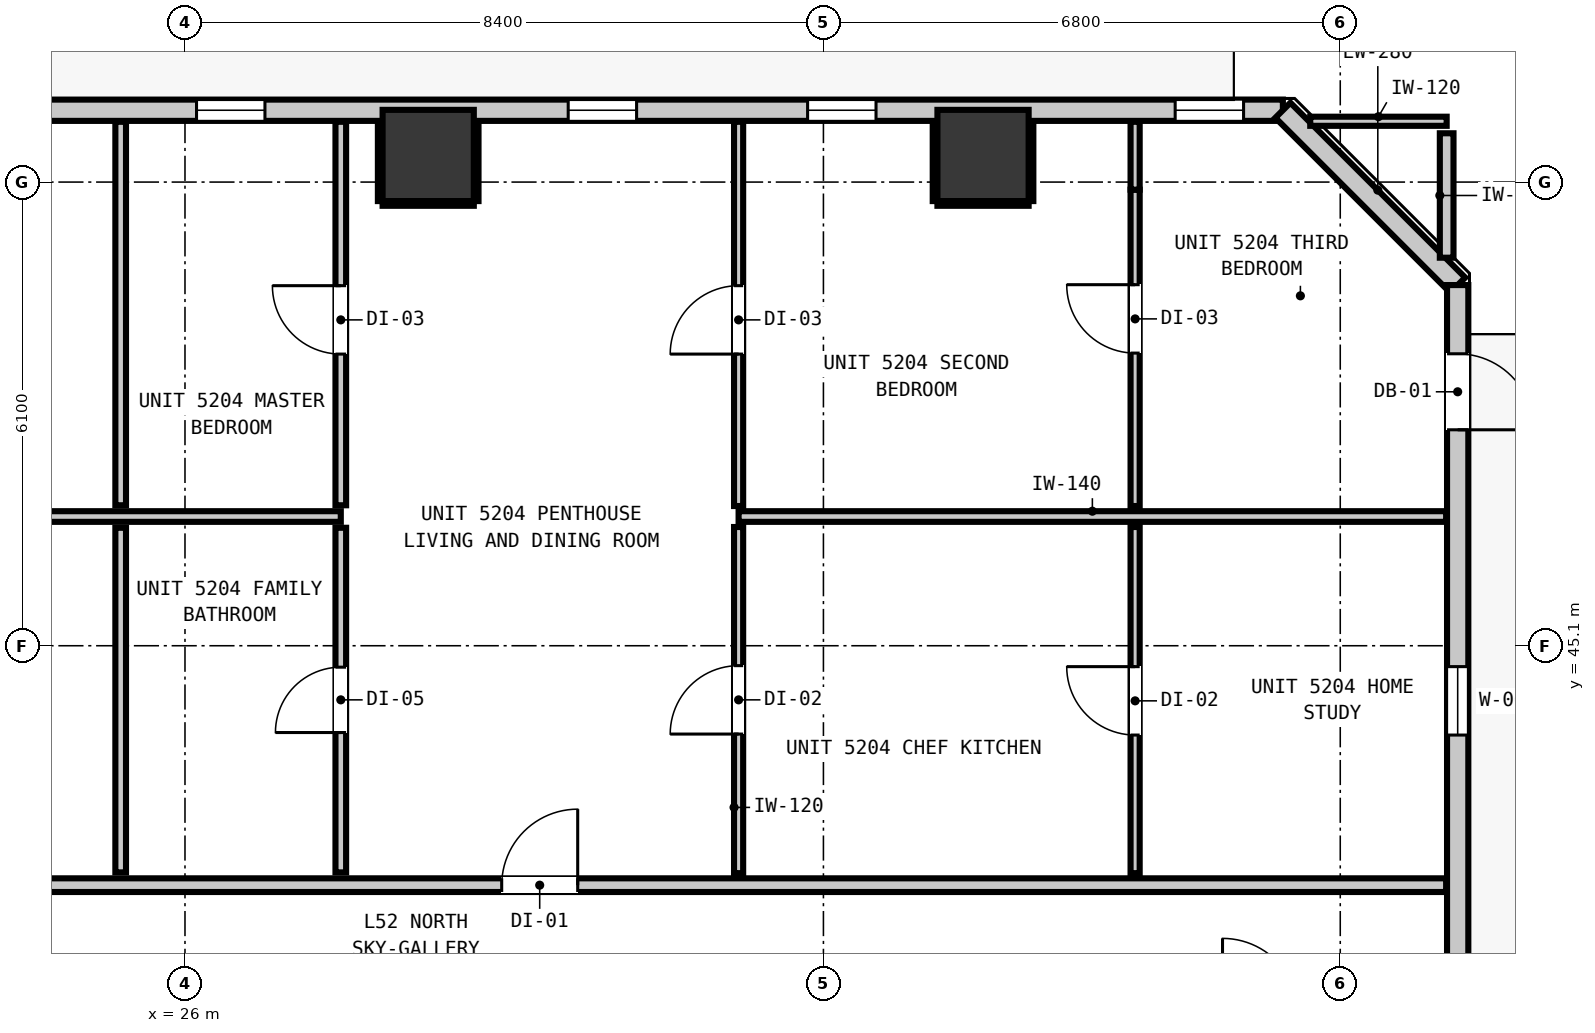
"""IFC4 building model, lengths in metres.
Left out: names, types, materials, properties, quantities, classifications, styles, units other than length and angle.
Written with IfcOpenShell. Run it as: python <this file> out.ifc"""

import sys

from ifc_helpers import new_model, si_unit, direction, frame, frame_2d, origin, origin_2d, place, context, subcontext, project, spatial, rectangle, extrude, element, fill, save


model = new_model("IFC4")
c1 = context("Model", 3, precision=1e-05, world=origin(), true_north=direction((0.0, 1.0)))
c2 = subcontext(c1, "Body", "Model", "MODEL_VIEW")
j1 = project(units=[si_unit("LENGTHUNIT", "METRE"), si_unit("PLANEANGLEUNIT", "RADIAN")], contexts=[c1])
p1 = place(None, origin())
s1 = spatial("IfcSite", under=j1, at=p1, CompositionType="ELEMENT")
p2 = place(p1, origin())
s2 = spatial("IfcBuilding", under=s1, at=p2, CompositionType="ELEMENT")
p3 = place(p2, frame((0.0, 0.0, 180.2)))
s3 = spatial("IfcBuildingStorey", under=s2, at=p3, CompositionType="ELEMENT", Elevation=180.2)
for number, where, z_axis, x_axis in (
    (1, (29.2, 51.55, 0.0), (0.0, 0.0, 1.0), (1.0, 0.0, 0.0)),
    (2, (36.5, 51.55, 0.0), (0.0, 0.0, 1.0), (1.0, 0.0, 0.0)),
):
    element("IfcColumn", number, at=place(p3, frame(where, z_axis=z_axis, x_axis=x_axis)), inside=s3, PredefinedType="COLUMN", context=c2, shape_type="SweptSolid", body=[
        extrude(rectangle(XDim=1.2, YDim=1.2, at=origin_2d()), origin(), (0.0, 0.0, 1.0), 3.32),
    ])
p4 = place(p3, frame((5.355, 52.145, 0.0), z_axis=(0.0, 0.0, 1.0), x_axis=(1.0, 0.0, 0.0)))
e3 = element("IfcWall", 3, at=p4, inside=s3, PredefinedType="STANDARD", context=c2, shape_type="SweptSolid", body=[
    extrude(rectangle(XDim=35.09, YDim=0.28, at=frame_2d((17.545, 0.0))), origin(), (0.0, 0.0, 1.0), 3.08),
])
p5 = place(p4, frame((0.904, 0.0, 0.0)))
e4 = element("IfcOpeningElement", 4, at=p5, cuts=e3, PredefinedType="OPENING", context=c2, shape_type="SweptSolid", body=[
    extrude(rectangle(XDim=1.0, YDim=2.15, at=frame_2d((0.5, 1.075))), frame((0.0, 0.15, 0.0), z_axis=(0.0, -1.0, 0.0), x_axis=(1.0, 0.0, 0.0)), (0.0, 0.0, 1.0), 0.3),
])
p6 = place(p4, frame((10.657, 0.0, 0.85)))
e5 = element("IfcOpeningElement", 5, at=p6, cuts=e3, PredefinedType="OPENING", context=c2, shape_type="SweptSolid", body=[
    extrude(rectangle(XDim=0.9, YDim=1.5, at=frame_2d((0.45, 0.75))), frame((0.0, 0.15, 0.0), z_axis=(0.0, -1.0, 0.0), x_axis=(1.0, 0.0, 0.0)), (0.0, 0.0, 1.0), 0.3),
])
p7 = place(p4, frame((17.422, 0.0, 0.85)))
e6 = element("IfcOpeningElement", 6, at=p7, cuts=e3, PredefinedType="OPENING", context=c2, shape_type="SweptSolid", body=[
    extrude(rectangle(XDim=0.9, YDim=1.5, at=frame_2d((0.45, 0.75))), frame((0.0, 0.15, 0.0), z_axis=(0.0, -1.0, 0.0), x_axis=(1.0, 0.0, 0.0)), (0.0, 0.0, 1.0), 0.3),
])
p8 = place(p4, frame((25.687, 0.0, 0.85)))
e7 = element("IfcOpeningElement", 7, at=p8, cuts=e3, PredefinedType="OPENING", context=c2, shape_type="SweptSolid", body=[
    extrude(rectangle(XDim=0.9, YDim=1.5, at=frame_2d((0.45, 0.75))), frame((0.0, 0.15, 0.0), z_axis=(0.0, -1.0, 0.0), x_axis=(1.0, 0.0, 0.0)), (0.0, 0.0, 1.0), 0.3),
])
p9 = place(p4, frame((20.797, 0.0, 0.85)))
e8 = element("IfcOpeningElement", 8, at=p9, cuts=e3, PredefinedType="OPENING", context=c2, shape_type="SweptSolid", body=[
    extrude(rectangle(XDim=0.9, YDim=1.5, at=frame_2d((0.45, 0.75))), frame((0.0, 0.15, 0.0), z_axis=(0.0, -1.0, 0.0), x_axis=(1.0, 0.0, 0.0)), (0.0, 0.0, 1.0), 0.3),
])
p10 = place(p4, frame((28.837, 0.0, 0.85)))
e9 = element("IfcOpeningElement", 9, at=p10, cuts=e3, PredefinedType="OPENING", context=c2, shape_type="SweptSolid", body=[
    extrude(rectangle(XDim=0.9, YDim=1.5, at=frame_2d((0.45, 0.75))), frame((0.0, 0.15, 0.0), z_axis=(0.0, -1.0, 0.0), x_axis=(1.0, 0.0, 0.0)), (0.0, 0.0, 1.0), 0.3),
])
p11 = place(p4, frame((33.673, 0.0, 0.85)))
e10 = element("IfcOpeningElement", 10, at=p11, cuts=e3, PredefinedType="OPENING", context=c2, shape_type="SweptSolid", body=[
    extrude(rectangle(XDim=0.9, YDim=1.5, at=frame_2d((0.45, 0.75))), frame((0.0, 0.15, 0.0), z_axis=(0.0, -1.0, 0.0), x_axis=(1.0, 0.0, 0.0)), (0.0, 0.0, 1.0), 0.3),
])
p12 = place(p3, frame((40.445, 52.145, 0.0), z_axis=(0.0, 0.0, 1.0), x_axis=(0.707106781187, -0.707106781187, 0.0)))
e11 = element("IfcWall", 11, at=p12, inside=s3, PredefinedType="STANDARD", context=c2, shape_type="SweptSolid", body=[
    extrude(rectangle(XDim=3.253, YDim=0.28, at=frame_2d((1.626, 0.0))), origin(), (0.0, 0.0, 1.0), 3.08),
])
p13 = place(p3, frame((42.745, 49.845, 0.0), z_axis=(0.0, 0.0, 1.0), x_axis=(0.0, -1.0, 0.0)))
e12 = element("IfcWall", 12, at=p13, inside=s3, PredefinedType="STANDARD", context=c2, shape_type="SweptSolid", body=[
    extrude(rectangle(XDim=32.29, YDim=0.28, at=frame_2d((16.145, 0.0))), origin(), (0.0, 0.0, 1.0), 3.08),
])
p14 = place(p13, frame((0.904, 0.0, 0.0)))
e13 = element("IfcOpeningElement", 13, at=p14, cuts=e12, PredefinedType="OPENING", context=c2, shape_type="SweptSolid", body=[
    extrude(rectangle(XDim=1.0, YDim=2.15, at=frame_2d((0.5, 1.075))), frame((0.0, 0.15, 0.0), z_axis=(0.0, -1.0, 0.0), x_axis=(1.0, 0.0, 0.0)), (0.0, 0.0, 1.0), 0.3),
])
p15 = place(p13, frame((5.02, 0.0, 0.85)))
e14 = element("IfcOpeningElement", 14, at=p15, cuts=e12, PredefinedType="OPENING", context=c2, shape_type="SweptSolid", body=[
    extrude(rectangle(XDim=0.9, YDim=1.5, at=frame_2d((0.45, 0.75))), frame((0.0, 0.15, 0.0), z_axis=(0.0, -1.0, 0.0), x_axis=(1.0, 0.0, 0.0)), (0.0, 0.0, 1.0), 0.3),
])
p16 = place(p13, frame((23.045, 0.0, 0.85)))
e15 = element("IfcOpeningElement", 15, at=p16, cuts=e12, PredefinedType="OPENING", context=c2, shape_type="SweptSolid", body=[
    extrude(rectangle(XDim=0.9, YDim=1.5, at=frame_2d((0.45, 0.75))), frame((0.0, 0.15, 0.0), z_axis=(0.0, -1.0, 0.0), x_axis=(1.0, 0.0, 0.0)), (0.0, 0.0, 1.0), 0.3),
])
p17 = place(p13, frame((12.253, 0.0, 0.85)))
e16 = element("IfcOpeningElement", 16, at=p17, cuts=e12, PredefinedType="OPENING", context=c2, shape_type="SweptSolid", body=[
    extrude(rectangle(XDim=0.9, YDim=1.5, at=frame_2d((0.45, 0.75))), frame((0.0, 0.15, 0.0), z_axis=(0.0, -1.0, 0.0), x_axis=(1.0, 0.0, 0.0)), (0.0, 0.0, 1.0), 0.3),
])
p18 = place(p3, frame((3.207, 41.95, 0.0), z_axis=(0.0, 0.0, 1.0), x_axis=(1.0, 0.0, 0.0)))
e17 = element("IfcWall", 17, at=p18, inside=s3, PredefinedType="PARTITIONING", context=c2, shape_type="SweptSolid", body=[
    extrude(rectangle(XDim=39.386, YDim=0.18, at=frame_2d((19.693, 0.0))), origin(), (0.0, 0.0, 1.0), 3.08),
])
p19 = place(p18, frame((9.727, 0.0, 0.0)))
e18 = element("IfcOpeningElement", 18, at=p19, cuts=e17, PredefinedType="OPENING", context=c2, shape_type="SweptSolid", body=[
    extrude(rectangle(XDim=1.0, YDim=2.15, at=frame_2d((0.5, 1.075))), frame((0.0, 0.1, 0.0), z_axis=(0.0, -1.0, 0.0), x_axis=(1.0, 0.0, 0.0)), (0.0, 0.0, 1.0), 0.2),
])
p20 = place(p18, frame((26.96, 0.0, 0.0)))
e19 = element("IfcOpeningElement", 19, at=p20, cuts=e17, PredefinedType="OPENING", context=c2, shape_type="SweptSolid", body=[
    extrude(rectangle(XDim=1.0, YDim=2.15, at=frame_2d((0.5, 1.075))), frame((0.0, 0.1, 0.0), z_axis=(0.0, -1.0, 0.0), x_axis=(1.0, 0.0, 0.0)), (0.0, 0.0, 1.0), 0.2),
])
p21 = place(p3, frame((3.207, 46.8, 0.0), z_axis=(0.0, 0.0, 1.0), x_axis=(1.0, 0.0, 0.0)))
e20 = element("IfcWall", 20, at=p21, inside=s3, PredefinedType="PARTITIONING", context=c2, shape_type="SweptSolid", body=[
    extrude(rectangle(XDim=24.843, YDim=0.14, at=frame_2d((12.421, 0.0))), origin(), (0.0, 0.0, 1.0), 3.08),
])
p22 = place(p21, frame((9.777, 0.0, 0.0)))
e21 = element("IfcOpeningElement", 21, at=p22, cuts=e20, PredefinedType="OPENING", context=c2, shape_type="SweptSolid", body=[
    extrude(rectangle(XDim=0.9, YDim=2.1, at=frame_2d((0.45, 1.05))), frame((0.0, 0.08, 0.0), z_axis=(0.0, -1.0, 0.0), x_axis=(1.0, 0.0, 0.0)), (0.0, 0.0, 1.0), 0.16),
])
p23 = place(p3, frame((33.284, 46.8, 0.0), z_axis=(0.0, 0.0, 1.0), x_axis=(1.0, 0.0, 0.0)))
e22 = element("IfcWall", 22, at=p23, inside=s3, PredefinedType="PARTITIONING", context=c2, shape_type="SweptSolid", body=[
    extrude(rectangle(XDim=9.309, YDim=0.14, at=frame_2d((4.655, 0.0))), origin(), (0.0, 0.0, 1.0), 3.08),
])
p24 = place(p3, frame((40.805, 52.0, 0.0), z_axis=(0.0, 0.0, 1.0), x_axis=(1.0, 0.0, 0.0)))
e23 = element("IfcWall", 23, at=p24, inside=s3, PredefinedType="PARTITIONING", context=c2, shape_type="SweptSolid", body=[
    extrude(rectangle(XDim=1.795, YDim=0.12, at=frame_2d((0.897, 0.0))), origin(), (0.0, 0.0, 1.0), 3.08),
])
p25 = place(p3, frame((42.6, 50.205, 0.0), z_axis=(0.0, 0.0, 1.0), x_axis=(0.0, 1.0, 0.0)))
e24 = element("IfcWall", 24, at=p25, inside=s3, PredefinedType="PARTITIONING", context=c2, shape_type="SweptSolid", body=[
    extrude(rectangle(XDim=1.637, YDim=0.18, at=frame_2d((0.818, 0.0))), origin(), (0.0, 0.0, 1.0), 3.08),
])
p26 = place(p3, frame((25.154, 42.118, 0.0), z_axis=(0.0, 0.0, 1.0), x_axis=(0.0, 1.0, 0.0)))
e25 = element("IfcWall", 25, at=p26, inside=s3, PredefinedType="PARTITIONING", context=c2, shape_type="SweptSolid", body=[
    extrude(rectangle(XDim=4.534, YDim=0.14, at=frame_2d((2.267, 0.0))), origin(), (0.0, 0.0, 1.0), 3.08),
])
p27 = place(p3, frame((25.154, 46.948, 0.0), z_axis=(0.0, 0.0, 1.0), x_axis=(0.0, 1.0, 0.0)))
e26 = element("IfcWall", 26, at=p27, inside=s3, PredefinedType="PARTITIONING", context=c2, shape_type="SweptSolid", body=[
    extrude(rectangle(XDim=5.045, YDim=0.14, at=frame_2d((2.522, 0.0))), origin(), (0.0, 0.0, 1.0), 3.08),
])
p28 = place(p3, frame((28.05, 42.118, 0.0), z_axis=(0.0, 0.0, 1.0), x_axis=(0.0, 1.0, 0.0)))
e27 = element("IfcWall", 27, at=p28, inside=s3, PredefinedType="PARTITIONING", context=c2, shape_type="SweptSolid", body=[
    extrude(rectangle(XDim=4.534, YDim=0.14, at=frame_2d((2.267, 0.0))), origin(), (0.0, 0.0, 1.0), 3.08),
])
p29 = place(p28, frame((1.84, 0.0, 0.0)))
e28 = element("IfcOpeningElement", 28, at=p29, cuts=e27, PredefinedType="OPENING", context=c2, shape_type="SweptSolid", body=[
    extrude(rectangle(XDim=0.86, YDim=2.02, at=frame_2d((0.43, 1.01))), frame((0.0, 0.08, 0.0), z_axis=(0.0, -1.0, 0.0), x_axis=(1.0, 0.0, 0.0)), (0.0, 0.0, 1.0), 0.16),
])
p30 = place(p3, frame((28.05, 46.948, 0.0), z_axis=(0.0, 0.0, 1.0), x_axis=(0.0, 1.0, 0.0)))
e29 = element("IfcWall", 29, at=p30, inside=s3, PredefinedType="PARTITIONING", context=c2, shape_type="SweptSolid", body=[
    extrude(rectangle(XDim=5.045, YDim=0.14, at=frame_2d((2.522, 0.0))), origin(), (0.0, 0.0, 1.0), 3.08),
])
p31 = place(p30, frame((1.989, 0.0, 0.0)))
e30 = element("IfcOpeningElement", 30, at=p31, cuts=e29, PredefinedType="OPENING", context=c2, shape_type="SweptSolid", body=[
    extrude(rectangle(XDim=0.9, YDim=2.1, at=frame_2d((0.45, 1.05))), frame((0.0, 0.08, 0.0), z_axis=(0.0, -1.0, 0.0), x_axis=(1.0, 0.0, 0.0)), (0.0, 0.0, 1.0), 0.16),
])
p32 = place(p3, frame((33.284, 42.108, 0.0), z_axis=(0.0, 0.0, 1.0), x_axis=(0.0, 1.0, 0.0)))
e31 = element("IfcWall", 31, at=p32, inside=s3, PredefinedType="PARTITIONING", context=c2, shape_type="SweptSolid", body=[
    extrude(rectangle(XDim=4.554, YDim=0.12, at=frame_2d((2.277, 0.0))), origin(), (0.0, 0.0, 1.0), 3.08),
])
p33 = place(p32, frame((1.83, 0.0, 0.0)))
e32 = element("IfcOpeningElement", 32, at=p33, cuts=e31, PredefinedType="OPENING", context=c2, shape_type="SweptSolid", body=[
    extrude(rectangle(XDim=0.9, YDim=2.1, at=frame_2d((0.45, 1.05))), frame((0.0, 0.07, 0.0), z_axis=(0.0, -1.0, 0.0), x_axis=(1.0, 0.0, 0.0)), (0.0, 0.0, 1.0), 0.14),
])
p34 = place(p3, frame((33.284, 46.938, 0.0), z_axis=(0.0, 0.0, 1.0), x_axis=(0.0, 1.0, 0.0)))
e33 = element("IfcWall", 33, at=p34, inside=s3, PredefinedType="PARTITIONING", context=c2, shape_type="SweptSolid", body=[
    extrude(rectangle(XDim=5.055, YDim=0.12, at=frame_2d((2.527, 0.0))), origin(), (0.0, 0.0, 1.0), 3.08),
])
p35 = place(p34, frame((1.999, 0.0, 0.0)))
e34 = element("IfcOpeningElement", 34, at=p35, cuts=e33, PredefinedType="OPENING", context=c2, shape_type="SweptSolid", body=[
    extrude(rectangle(XDim=0.9, YDim=2.1, at=frame_2d((0.45, 1.05))), frame((0.0, 0.07, 0.0), z_axis=(0.0, -1.0, 0.0), x_axis=(1.0, 0.0, 0.0)), (0.0, 0.0, 1.0), 0.14),
])
p36 = place(p3, frame((38.501, 42.108, 0.0), z_axis=(0.0, 0.0, 1.0), x_axis=(0.0, 1.0, 0.0)))
e35 = element("IfcWall", 35, at=p36, inside=s3, PredefinedType="PARTITIONING", context=c2, shape_type="SweptSolid", body=[
    extrude(rectangle(XDim=4.554, YDim=0.12, at=frame_2d((2.277, 0.0))), origin(), (0.0, 0.0, 1.0), 2.565),
])
p37 = place(p36, frame((1.817, 0.0, 0.0)))
e36 = element("IfcOpeningElement", 36, at=p37, cuts=e35, PredefinedType="OPENING", context=c2, shape_type="SweptSolid", body=[
    extrude(rectangle(XDim=0.9, YDim=2.1, at=frame_2d((0.45, 1.05))), frame((0.0, 0.07, 0.0), z_axis=(0.0, -1.0, 0.0), x_axis=(1.0, 0.0, 0.0)), (0.0, 0.0, 1.0), 0.14),
])
p38 = place(p3, frame((38.501, 46.938, 0.0), z_axis=(0.0, 0.0, 1.0), x_axis=(0.0, 1.0, 0.0)))
e37 = element("IfcWall", 37, at=p38, inside=s3, PredefinedType="PARTITIONING", context=c2, shape_type="SweptSolid", body=[
    extrude(rectangle(XDim=4.162, YDim=0.12, at=frame_2d((2.081, 0.0))), origin(), (0.0, 0.0, 1.0), 2.565),
])
p39 = place(p38, frame((2.012, 0.0, 0.0)))
e38 = element("IfcOpeningElement", 38, at=p39, cuts=e37, PredefinedType="OPENING", context=c2, shape_type="SweptSolid", body=[
    extrude(rectangle(XDim=0.9, YDim=2.1, at=frame_2d((0.45, 1.05))), frame((0.0, 0.07, 0.0), z_axis=(0.0, -1.0, 0.0), x_axis=(1.0, 0.0, 0.0)), (0.0, 0.0, 1.0), 0.14),
])
p40 = place(p3, frame((38.501, 51.1, 0.0), z_axis=(0.0, 0.0, 1.0), x_axis=(0.0, 1.0, 0.0)))
e39 = element("IfcWall", 39, at=p40, inside=s3, PredefinedType="PARTITIONING", context=c2, shape_type="SweptSolid", body=[
    extrude(rectangle(XDim=0.893, YDim=0.12, at=frame_2d((0.446, 0.0))), origin(), (0.0, 0.0, 1.0), 3.08),
])
p41 = place(p3, frame((28.6, 50.918, 0.0), z_axis=(0.0, 0.0, 1.0), x_axis=(1.0, 0.0, 0.0)))
e40 = element("IfcWall", 40, at=p41, inside=s3, PredefinedType="PARTITIONING", context=c2, shape_type="SweptSolid", body=[
    extrude(rectangle(XDim=1.2, YDim=0.06, at=frame_2d((0.6, 0.0))), origin(), (0.0, 0.0, 1.0), 1.45),
])
for number, where, z_axis, x_axis in (
    (41, (28.568, 50.95, 0.0), (0.0, 0.0, 1.0), (0.0, 1.0, 0.0)),
    (42, (29.832, 50.95, 0.0), (0.0, 0.0, 1.0), (0.0, 1.0, 0.0)),
):
    element("IfcWall", number, at=place(p3, frame(where, z_axis=z_axis, x_axis=x_axis)), inside=s3, PredefinedType="PARTITIONING", context=c2, shape_type="SweptSolid", body=[
        extrude(rectangle(XDim=1.04, YDim=0.06, at=frame_2d((0.52, 0.0))), origin(), (0.0, 0.0, 1.0), 1.45),
    ])
p42 = place(p3, frame((35.9, 50.918, 0.0), z_axis=(0.0, 0.0, 1.0), x_axis=(1.0, 0.0, 0.0)))
e43 = element("IfcWall", 43, at=p42, inside=s3, PredefinedType="PARTITIONING", context=c2, shape_type="SweptSolid", body=[
    extrude(rectangle(XDim=1.2, YDim=0.06, at=frame_2d((0.6, 0.0))), origin(), (0.0, 0.0, 1.0), 1.45),
])
for number, where, z_axis, x_axis in (
    (44, (35.868, 50.95, 0.0), (0.0, 0.0, 1.0), (0.0, 1.0, 0.0)),
    (45, (37.132, 50.95, 0.0), (0.0, 0.0, 1.0), (0.0, 1.0, 0.0)),
):
    element("IfcWall", number, at=place(p3, frame(where, z_axis=z_axis, x_axis=x_axis)), inside=s3, PredefinedType="PARTITIONING", context=c2, shape_type="SweptSolid", body=[
        extrude(rectangle(XDim=1.04, YDim=0.06, at=frame_2d((0.52, 0.0))), origin(), (0.0, 0.0, 1.0), 1.45),
    ])
p43 = place(p14, origin())
e46 = element("IfcDoor", 46, at=p43, inside=s3, OperationType="SINGLE_SWING_RIGHT", PredefinedType="DOOR", context=c2, shape_type="SweptSolid", body=[
    extrude(rectangle(XDim=1.0, YDim=2.15, at=frame_2d((0.5, 1.075))), frame((0.0, 0.025, 0.0), z_axis=(0.0, -1.0, 0.0), x_axis=(1.0, 0.0, 0.0)), (0.0, 0.0, 1.0), 0.05),
])
fill(e13, e46)
p44 = place(p8, origin())
e47 = element("IfcWindow", 47, at=p44, inside=s3, PartitioningType="SINGLE_PANEL", PredefinedType="WINDOW", context=c2, shape_type="SweptSolid", body=[
    extrude(rectangle(XDim=0.9, YDim=1.5, at=frame_2d((0.45, 0.75))), frame((0.0, 0.03, 0.0), z_axis=(0.0, -1.0, 0.0), x_axis=(1.0, 0.0, 0.0)), (0.0, 0.0, 1.0), 0.06),
])
fill(e7, e47)
p45 = place(p9, origin())
e48 = element("IfcWindow", 48, at=p45, inside=s3, PartitioningType="SINGLE_PANEL", PredefinedType="WINDOW", context=c2, shape_type="SweptSolid", body=[
    extrude(rectangle(XDim=0.9, YDim=1.5, at=frame_2d((0.45, 0.75))), frame((0.0, 0.03, 0.0), z_axis=(0.0, -1.0, 0.0), x_axis=(1.0, 0.0, 0.0)), (0.0, 0.0, 1.0), 0.06),
])
fill(e8, e48)
p46 = place(p10, origin())
e49 = element("IfcWindow", 49, at=p46, inside=s3, PartitioningType="SINGLE_PANEL", PredefinedType="WINDOW", context=c2, shape_type="SweptSolid", body=[
    extrude(rectangle(XDim=0.9, YDim=1.5, at=frame_2d((0.45, 0.75))), frame((0.0, 0.03, 0.0), z_axis=(0.0, -1.0, 0.0), x_axis=(1.0, 0.0, 0.0)), (0.0, 0.0, 1.0), 0.06),
])
fill(e9, e49)
p47 = place(p11, origin())
e50 = element("IfcWindow", 50, at=p47, inside=s3, PartitioningType="SINGLE_PANEL", PredefinedType="WINDOW", context=c2, shape_type="SweptSolid", body=[
    extrude(rectangle(XDim=0.9, YDim=1.5, at=frame_2d((0.45, 0.75))), frame((0.0, 0.03, 0.0), z_axis=(0.0, -1.0, 0.0), x_axis=(1.0, 0.0, 0.0)), (0.0, 0.0, 1.0), 0.06),
])
fill(e10, e50)
p48 = place(p15, origin())
e51 = element("IfcWindow", 51, at=p48, inside=s3, PartitioningType="SINGLE_PANEL", PredefinedType="WINDOW", context=c2, shape_type="SweptSolid", body=[
    extrude(rectangle(XDim=0.9, YDim=1.5, at=frame_2d((0.45, 0.75))), frame((0.0, 0.03, 0.0), z_axis=(0.0, -1.0, 0.0), x_axis=(1.0, 0.0, 0.0)), (0.0, 0.0, 1.0), 0.06),
])
fill(e14, e51)
p49 = place(p20, origin())
e52 = element("IfcDoor", 52, at=p49, inside=s3, OperationType="SINGLE_SWING_RIGHT", PredefinedType="DOOR", context=c2, shape_type="SweptSolid", body=[
    extrude(rectangle(XDim=1.0, YDim=2.15, at=frame_2d((0.5, 1.075))), frame((0.0, 0.025, 0.0), z_axis=(0.0, -1.0, 0.0), x_axis=(1.0, 0.0, 0.0)), (0.0, 0.0, 1.0), 0.05),
])
fill(e19, e52)
p50 = place(p29, origin())
e53 = element("IfcDoor", 53, at=p50, inside=s3, OperationType="SINGLE_SWING_LEFT", PredefinedType="DOOR", context=c2, shape_type="SweptSolid", body=[
    extrude(rectangle(XDim=0.86, YDim=2.02, at=frame_2d((0.43, 1.01))), frame((0.0, 0.025, 0.0), z_axis=(0.0, -1.0, 0.0), x_axis=(1.0, 0.0, 0.0)), (0.0, 0.0, 1.0), 0.05),
])
fill(e28, e53)
p51 = place(p31, origin())
e54 = element("IfcDoor", 54, at=p51, inside=s3, OperationType="SINGLE_SWING_RIGHT", PredefinedType="DOOR", context=c2, shape_type="SweptSolid", body=[
    extrude(rectangle(XDim=0.9, YDim=2.1, at=frame_2d((0.45, 1.05))), frame((0.0, 0.025, 0.0), z_axis=(0.0, -1.0, 0.0), x_axis=(1.0, 0.0, 0.0)), (0.0, 0.0, 1.0), 0.05),
])
fill(e30, e54)
p52 = place(p33, origin())
e55 = element("IfcDoor", 55, at=p52, inside=s3, OperationType="SINGLE_SWING_LEFT", PredefinedType="DOOR", context=c2, shape_type="SweptSolid", body=[
    extrude(rectangle(XDim=0.9, YDim=2.1, at=frame_2d((0.45, 1.05))), frame((0.0, 0.025, 0.0), z_axis=(0.0, -1.0, 0.0), x_axis=(1.0, 0.0, 0.0)), (0.0, 0.0, 1.0), 0.05),
])
fill(e32, e55)
p53 = place(p37, origin())
e56 = element("IfcDoor", 56, at=p53, inside=s3, OperationType="SINGLE_SWING_RIGHT", PredefinedType="DOOR", context=c2, shape_type="SweptSolid", body=[
    extrude(rectangle(XDim=0.9, YDim=2.1, at=frame_2d((0.45, 1.05))), frame((0.0, 0.025, 0.0), z_axis=(0.0, -1.0, 0.0), x_axis=(1.0, 0.0, 0.0)), (0.0, 0.0, 1.0), 0.05),
])
fill(e36, e56)
p54 = place(p35, origin())
e57 = element("IfcDoor", 57, at=p54, inside=s3, OperationType="SINGLE_SWING_LEFT", PredefinedType="DOOR", context=c2, shape_type="SweptSolid", body=[
    extrude(rectangle(XDim=0.9, YDim=2.1, at=frame_2d((0.45, 1.05))), frame((0.0, 0.025, 0.0), z_axis=(0.0, -1.0, 0.0), x_axis=(1.0, 0.0, 0.0)), (0.0, 0.0, 1.0), 0.05),
])
fill(e34, e57)
p55 = place(p39, origin())
e58 = element("IfcDoor", 58, at=p55, inside=s3, OperationType="SINGLE_SWING_RIGHT", PredefinedType="DOOR", context=c2, shape_type="SweptSolid", body=[
    extrude(rectangle(XDim=0.9, YDim=2.1, at=frame_2d((0.45, 1.05))), frame((0.0, 0.025, 0.0), z_axis=(0.0, -1.0, 0.0), x_axis=(1.0, 0.0, 0.0)), (0.0, 0.0, 1.0), 0.05),
])
fill(e38, e58)
save(model, sys.argv[1])
